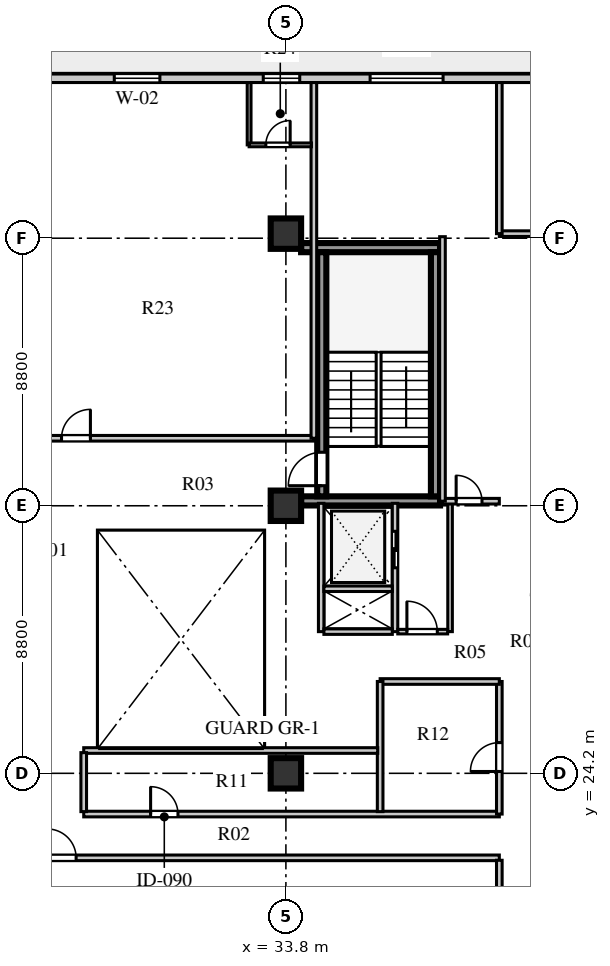
"""IFC4 building model, lengths in metres.
Left out: names, types, materials, properties, quantities, classifications, styles, units other than length and angle.
Written with IfcOpenShell. Run it as: python <this file> out.ifc"""

import sys

from ifc_helpers import new_model, si_unit, direction, frame, frame_2d, origin, origin_2d, place, context, subcontext, project, spatial, rectangle, extrude, element, fill, save


model = new_model("IFC4")
c1 = context("Model", 3, precision=1e-05, world=origin(), true_north=direction((0.0, 1.0)))
c2 = subcontext(c1, "Body", "Model", "MODEL_VIEW")
j1 = project(units=[si_unit("LENGTHUNIT", "METRE"), si_unit("PLANEANGLEUNIT", "RADIAN")], contexts=[c1])
p1 = place(None, origin())
s1 = spatial("IfcSite", under=j1, at=p1, CompositionType="ELEMENT")
p2 = place(p1, origin())
s2 = spatial("IfcBuilding", under=s1, at=p2, CompositionType="ELEMENT")
p3 = place(p2, frame((0.0, 0.0, 150.2)))
s3 = spatial("IfcBuildingStorey", under=s2, at=p3, CompositionType="ELEMENT", Elevation=150.2)
for number, where, z_axis, x_axis in (
    (1, (34.3, 33.16, 0.0), (0.0, 0.0, 1.0), (1.0, 0.0, 0.0)),
    (2, (34.3, 41.49, 0.0), (0.0, 0.0, 1.0), (1.0, 0.0, 0.0)),
):
    element("IfcWall", number, at=place(p3, frame(where, z_axis=z_axis, x_axis=x_axis)), inside=s3, PredefinedType="SHEAR", context=c2, shape_type="SweptSolid", body=[
        extrude(rectangle(XDim=4.57, YDim=0.3, at=frame_2d((2.285, 0.0))), origin(), (0.0, 0.0, 1.0), 3.55),
    ])
p4 = place(p3, frame((34.98, 33.31, 0.0), z_axis=(0.0, 0.0, 1.0), x_axis=(0.0, 1.0, 0.0)))
e3 = element("IfcWall", 3, at=p4, inside=s3, PredefinedType="SHEAR", context=c2, shape_type="SweptSolid", body=[
    extrude(rectangle(XDim=8.03, YDim=0.3, at=frame_2d((4.015, 0.0))), origin(), (0.0, 0.0, 1.0), 3.55),
])
p5 = place(p4, frame((0.35, 0.0, 0.0)))
e4 = element("IfcOpeningElement", 4, at=p5, cuts=e3, PredefinedType="OPENING", context=c2, shape_type="SweptSolid", body=[
    extrude(rectangle(XDim=1.1, YDim=2.1, at=frame_2d((0.55, 1.05))), frame((0.0, 0.16, 0.0), z_axis=(0.0, -1.0, 0.0), x_axis=(1.0, 0.0, 0.0)), (0.0, 0.0, 1.0), 0.32),
])
p6 = place(p3, frame((38.72, 33.31, 0.0), z_axis=(0.0, 0.0, 1.0), x_axis=(0.0, 1.0, 0.0)))
e5 = element("IfcWall", 5, at=p6, inside=s3, PredefinedType="SHEAR", context=c2, shape_type="SweptSolid", body=[
    extrude(rectangle(XDim=8.03, YDim=0.3, at=frame_2d((4.015, 0.0))), origin(), (0.0, 0.0, 1.0), 3.55),
])
for number, where, z_axis, x_axis in (
    (6, (33.8, 24.2, 0.0), (0.0, 0.0, 1.0), (1.0, 0.0, 0.0)),
    (7, (33.8, 33.0, 0.0), (0.0, 0.0, 1.0), (1.0, 0.0, 0.0)),
    (8, (33.8, 41.95, 0.0), (0.0, 0.0, 1.0), (1.0, 0.0, 0.0)),
):
    element("IfcColumn", number, at=place(p3, frame(where, z_axis=z_axis, x_axis=x_axis)), inside=s3, PredefinedType="COLUMN", context=c2, shape_type="SweptSolid", body=[
        extrude(rectangle(XDim=1.0, YDim=1.0, at=origin_2d()), origin(), (0.0, 0.0, 1.0), 3.55),
    ])
p7 = place(p3, frame((45.35, 47.06, 0.0), z_axis=(0.0, 0.0, 1.0), x_axis=(-1.0, 0.0, 0.0)))
e9 = element("IfcWall", 9, at=p7, inside=s3, PredefinedType="STANDARD", context=c2, shape_type="SweptSolid", body=[
    extrude(rectangle(XDim=32.1, YDim=0.28, at=frame_2d((16.05, 0.0))), origin(), (0.0, 0.0, 1.0), 3.55),
])
p8 = place(p7, frame((30.15, 0.0, 0.0)))
e10 = element("IfcOpeningElement", 10, at=p8, cuts=e9, PredefinedType="OPENING", context=c2, shape_type="SweptSolid", body=[
    extrude(rectangle(XDim=1.0, YDim=2.05, at=frame_2d((0.5, 1.025))), frame((0.0, 0.15, 0.0), z_axis=(0.0, -1.0, 0.0), x_axis=(1.0, 0.0, 0.0)), (0.0, 0.0, 1.0), 0.3),
])
p9 = place(p7, frame((24.27, 0.0, 0.8)))
e11 = element("IfcOpeningElement", 11, at=p9, cuts=e9, PredefinedType="OPENING", context=c2, shape_type="SweptSolid", body=[
    extrude(rectangle(XDim=1.8, YDim=2.0, at=frame_2d((0.9, 1.0))), frame((0.0, 0.15, 0.0), z_axis=(0.0, -1.0, 0.0), x_axis=(1.0, 0.0, 0.0)), (0.0, 0.0, 1.0), 0.3),
])
p10 = place(p7, frame((15.695, 0.0, 0.8)))
e12 = element("IfcOpeningElement", 12, at=p10, cuts=e9, PredefinedType="OPENING", context=c2, shape_type="SweptSolid", body=[
    extrude(rectangle(XDim=1.5, YDim=2.0, at=frame_2d((0.75, 1.0))), frame((0.0, 0.15, 0.0), z_axis=(0.0, -1.0, 0.0), x_axis=(1.0, 0.0, 0.0)), (0.0, 0.0, 1.0), 0.3),
])
p11 = place(p7, frame((11.095, 0.0, 0.8)))
e13 = element("IfcOpeningElement", 13, at=p11, cuts=e9, PredefinedType="OPENING", context=c2, shape_type="SweptSolid", body=[
    extrude(rectangle(XDim=1.2, YDim=1.75, at=frame_2d((0.6, 0.875))), frame((0.0, 0.15, 0.0), z_axis=(0.0, -1.0, 0.0), x_axis=(1.0, 0.0, 0.0)), (0.0, 0.0, 1.0), 0.3),
])
p12 = place(p7, frame((6.38, 0.0, 0.8)))
e14 = element("IfcOpeningElement", 14, at=p12, cuts=e9, PredefinedType="OPENING", context=c2, shape_type="SweptSolid", body=[
    extrude(rectangle(XDim=2.4, YDim=2.05, at=frame_2d((1.2, 1.025))), frame((0.0, 0.15, 0.0), z_axis=(0.0, -1.0, 0.0), x_axis=(1.0, 0.0, 0.0)), (0.0, 0.0, 1.0), 0.3),
])
p13 = place(p7, frame((1.27, 0.0, 0.8)))
e15 = element("IfcOpeningElement", 15, at=p13, cuts=e9, PredefinedType="OPENING", context=c2, shape_type="SweptSolid", body=[
    extrude(rectangle(XDim=2.1, YDim=1.95, at=frame_2d((1.05, 0.975))), frame((0.0, 0.15, 0.0), z_axis=(0.0, -1.0, 0.0), x_axis=(1.0, 0.0, 0.0)), (0.0, 0.0, 1.0), 0.3),
])
p14 = place(p3, frame((34.96, 28.86, 0.0), z_axis=(0.0, 0.0, 1.0), x_axis=(0.0, 1.0, 0.0)))
e16 = element("IfcWall", 16, at=p14, inside=s3, PredefinedType="SOLIDWALL", context=c2, shape_type="SweptSolid", body=[
    extrude(rectangle(XDim=4.22, YDim=0.18, at=frame_2d((2.11, 0.0))), origin(), (0.0, 0.0, 1.0), 3.55),
])
p15 = place(p3, frame((37.39, 28.86, 0.0), z_axis=(0.0, 0.0, 1.0), x_axis=(0.0, 1.0, 0.0)))
e17 = element("IfcWall", 17, at=p15, inside=s3, PredefinedType="SOLIDWALL", context=c2, shape_type="SweptSolid", body=[
    extrude(rectangle(XDim=4.22, YDim=0.18, at=frame_2d((2.11, 0.0))), origin(), (0.0, 0.0, 1.0), 3.55),
])
p16 = place(p15, frame((2.1, 0.0, 0.0)))
e18 = element("IfcOpeningElement", 18, at=p16, cuts=e17, PredefinedType="OPENING", context=c2, shape_type="SweptSolid", body=[
    extrude(rectangle(XDim=1.2, YDim=2.12, at=frame_2d((0.6, 1.06))), frame((0.0, 0.1, 0.0), z_axis=(0.0, -1.0, 0.0), x_axis=(1.0, 0.0, 0.0)), (0.0, 0.0, 1.0), 0.2),
])
for number, where, z_axis, x_axis in (
    (19, (35.05, 28.86, 0.0), (0.0, 0.0, 1.0), (1.0, 0.0, 0.0)),
    (20, (35.05, 30.27, 0.0), (0.0, 0.0, 1.0), (1.0, 0.0, 0.0)),
):
    element("IfcWall", number, at=place(p3, frame(where, z_axis=z_axis, x_axis=x_axis)), inside=s3, PredefinedType="SOLIDWALL", context=c2, shape_type="SweptSolid", body=[
        extrude(rectangle(XDim=2.25, YDim=0.18, at=frame_2d((1.125, 0.0))), origin(), (0.0, 0.0, 1.0), 3.55),
    ])
p17 = place(p3, frame((39.2, 28.86, 0.0), z_axis=(0.0, 0.0, 1.0), x_axis=(0.0, 1.0, 0.0)))
e21 = element("IfcWall", 21, at=p17, inside=s3, PredefinedType="PARTITIONING", context=c2, shape_type="SweptSolid", body=[
    extrude(rectangle(XDim=4.22, YDim=0.15, at=frame_2d((2.11, 0.0))), origin(), (0.0, 0.0, 1.0), 3.55),
])
p18 = place(p3, frame((37.48, 28.86, 0.0), z_axis=(0.0, 0.0, 1.0), x_axis=(1.0, 0.0, 0.0)))
e22 = element("IfcWall", 22, at=p18, inside=s3, PredefinedType="PARTITIONING", context=c2, shape_type="SweptSolid", body=[
    extrude(rectangle(XDim=1.64, YDim=0.15, at=frame_2d((0.82, 0.0))), origin(), (0.0, 0.0, 1.0), 3.55),
])
p19 = place(p18, frame((0.3, 0.0, 0.0)))
e23 = element("IfcOpeningElement", 23, at=p19, cuts=e22, PredefinedType="OPENING", context=c2, shape_type="SweptSolid", body=[
    extrude(rectangle(XDim=1.0, YDim=2.1, at=frame_2d((0.5, 1.05))), frame((0.0, 0.085, 0.0), z_axis=(0.0, -1.0, 0.0), x_axis=(1.0, 0.0, 0.0)), (0.0, 0.0, 1.0), 0.17),
])
p20 = place(p3, frame((25.22, 21.42, 0.0), z_axis=(0.0, 0.0, 1.0), x_axis=(1.0, 0.0, 0.0)))
e24 = element("IfcWall", 24, at=p20, inside=s3, PredefinedType="SOLIDWALL", context=c2, shape_type="SweptSolid", body=[
    extrude(rectangle(XDim=15.6, YDim=0.185, at=frame_2d((7.8, 0.0))), origin(), (0.0, 0.0, 1.0), 3.15),
])
p21 = place(p20, frame((0.73, 0.0, 0.0)))
e25 = element("IfcOpeningElement", 25, at=p21, cuts=e24, PredefinedType="OPENING", context=c2, shape_type="SweptSolid", body=[
    extrude(rectangle(XDim=0.95, YDim=2.1, at=frame_2d((0.475, 1.05))), frame((0.0, 0.103, 0.0), z_axis=(0.0, -1.0, 0.0), x_axis=(1.0, 0.0, 0.0)), (0.0, 0.0, 1.0), 0.205),
])
p22 = place(p3, frame((27.15, 22.86, 0.0), z_axis=(0.0, 0.0, 1.0), x_axis=(1.0, 0.0, 0.0)))
e26 = element("IfcWall", 26, at=p22, inside=s3, PredefinedType="SOLIDWALL", context=c2, shape_type="SweptSolid", body=[
    extrude(rectangle(XDim=13.67, YDim=0.185, at=frame_2d((6.835, 0.0))), origin(), (0.0, 0.0, 1.0), 3.55),
])
p23 = place(p22, frame((2.2, 0.0, 0.0)))
e27 = element("IfcOpeningElement", 27, at=p23, cuts=e26, PredefinedType="OPENING", context=c2, shape_type="SweptSolid", body=[
    extrude(rectangle(XDim=0.9, YDim=2.08, at=frame_2d((0.45, 1.04))), frame((0.0, 0.103, 0.0), z_axis=(0.0, -1.0, 0.0), x_axis=(1.0, 0.0, 0.0)), (0.0, 0.0, 1.0), 0.205),
])
p24 = place(p3, frame((25.22, 35.22, 0.0), z_axis=(0.0, 0.0, 1.0), x_axis=(1.0, 0.0, 0.0)))
e28 = element("IfcWall", 28, at=p24, inside=s3, PredefinedType="SOLIDWALL", context=c2, shape_type="SweptSolid", body=[
    extrude(rectangle(XDim=9.5, YDim=0.185, at=frame_2d((4.75, 0.0))), origin(), (0.0, 0.0, 1.0), 3.55),
])
p25 = place(p24, frame((1.2, 0.0, 0.0)))
e29 = element("IfcOpeningElement", 29, at=p25, cuts=e28, PredefinedType="OPENING", context=c2, shape_type="SweptSolid", body=[
    extrude(rectangle(XDim=0.95, YDim=2.1, at=frame_2d((0.475, 1.05))), frame((0.0, 0.103, 0.0), z_axis=(0.0, -1.0, 0.0), x_axis=(1.0, 0.0, 0.0)), (0.0, 0.0, 1.0), 0.205),
])
p26 = place(p3, frame((40.82, 41.95, 0.0), z_axis=(0.0, 0.0, 1.0), x_axis=(1.0, 0.0, 0.0)))
e30 = element("IfcWall", 30, at=p26, inside=s3, PredefinedType="SOLIDWALL", context=c2, shape_type="SweptSolid", body=[
    extrude(rectangle(XDim=7.3, YDim=0.185, at=frame_2d((3.65, 0.0))), origin(), (0.0, 0.0, 1.0), 2.9),
])
p27 = place(p3, frame((40.82, 22.86, 0.0), z_axis=(0.0, 0.0, 1.0), x_axis=(0.0, 1.0, 0.0)))
e31 = element("IfcWall", 31, at=p27, inside=s3, PredefinedType="SOLIDWALL", context=c2, shape_type="SweptSolid", body=[
    extrude(rectangle(XDim=4.36, YDim=0.185, at=frame_2d((2.18, 0.0))), origin(), (0.0, 0.0, 1.0), 3.55),
])
p28 = place(p27, frame((1.4, 0.0, 0.0)))
e32 = element("IfcOpeningElement", 32, at=p28, cuts=e31, PredefinedType="OPENING", context=c2, shape_type="SweptSolid", body=[
    extrude(rectangle(XDim=0.95, YDim=2.1, at=frame_2d((0.475, 1.05))), frame((0.0, 0.103, 0.0), z_axis=(0.0, -1.0, 0.0), x_axis=(1.0, 0.0, 0.0)), (0.0, 0.0, 1.0), 0.205),
])
p29 = place(p3, frame((36.9, 27.22, 0.0), z_axis=(0.0, 0.0, 1.0), x_axis=(1.0, 0.0, 0.0)))
e33 = element("IfcWall", 33, at=p29, inside=s3, PredefinedType="SOLIDWALL", context=c2, shape_type="SweptSolid", body=[
    extrude(rectangle(XDim=3.92, YDim=0.185, at=frame_2d((1.96, 0.0))), origin(), (0.0, 0.0, 1.0), 3.15),
])
p30 = place(p3, frame((36.9, 22.94, 0.0), z_axis=(0.0, 0.0, 1.0), x_axis=(0.0, 1.0, 0.0)))
e34 = element("IfcWall", 34, at=p30, inside=s3, PredefinedType="SOLIDWALL", context=c2, shape_type="SweptSolid", body=[
    extrude(rectangle(XDim=4.28, YDim=0.185, at=frame_2d((2.14, 0.0))), origin(), (0.0, 0.0, 1.0), 3.55),
])
p31 = place(p3, frame((27.15, 24.95, 0.0), z_axis=(0.0, 0.0, 1.0), x_axis=(1.0, 0.0, 0.0)))
e35 = element("IfcWall", 35, at=p31, inside=s3, PredefinedType="SOLIDWALL", context=c2, shape_type="SweptSolid", body=[
    extrude(rectangle(XDim=9.67, YDim=0.185, at=frame_2d((4.835, 0.0))), origin(), (0.0, 0.0, 1.0), 3.0),
])
p32 = place(p3, frame((27.15, 22.94, 0.0), z_axis=(0.0, 0.0, 1.0), x_axis=(0.0, 1.0, 0.0)))
e36 = element("IfcWall", 36, at=p32, inside=s3, PredefinedType="SOLIDWALL", context=c2, shape_type="SweptSolid", body=[
    extrude(rectangle(XDim=1.94, YDim=0.185, at=frame_2d((0.97, 0.0))), origin(), (0.0, 0.0, 1.0), 3.55),
])
p33 = place(p3, frame((40.82, 10.28, 0.0), z_axis=(0.0, 0.0, 1.0), x_axis=(0.0, 1.0, 0.0)))
e37 = element("IfcWall", 37, at=p33, inside=s3, PredefinedType="SOLIDWALL", context=c2, shape_type="SweptSolid", body=[
    extrude(rectangle(XDim=11.06, YDim=0.185, at=frame_2d((5.53, 0.0))), origin(), (0.0, 0.0, 1.0), 3.55),
])
p34 = place(p3, frame((34.72, 35.22, 0.0), z_axis=(0.0, 0.0, 1.0), x_axis=(0.0, 1.0, 0.0)))
e38 = element("IfcWall", 38, at=p34, inside=s3, PredefinedType="SOLIDWALL", context=c2, shape_type="SweptSolid", body=[
    extrude(rectangle(XDim=11.7, YDim=0.185, at=frame_2d((5.85, 0.0))), origin(), (0.0, 0.0, 1.0), 3.55),
])
p35 = place(p3, frame((32.59, 44.87, 0.0), z_axis=(0.0, 0.0, 1.0), x_axis=(0.0, 1.0, 0.0)))
e39 = element("IfcWall", 39, at=p35, inside=s3, PredefinedType="PLUMBINGWALL", context=c2, shape_type="SweptSolid", body=[
    extrude(rectangle(XDim=2.05, YDim=0.125, at=frame_2d((1.025, 0.0))), origin(), (0.0, 0.0, 1.0), 3.55),
])
p36 = place(p3, frame((32.59, 44.87, 0.0), z_axis=(0.0, 0.0, 1.0), x_axis=(1.0, 0.0, 0.0)))
e40 = element("IfcWall", 40, at=p36, inside=s3, PredefinedType="PLUMBINGWALL", context=c2, shape_type="SweptSolid", body=[
    extrude(rectangle(XDim=2.05, YDim=0.125, at=frame_2d((1.025, 0.0))), origin(), (0.0, 0.0, 1.0), 3.55),
])
p37 = place(p36, frame((0.55, 0.0, 0.0)))
e41 = element("IfcOpeningElement", 41, at=p37, cuts=e40, PredefinedType="OPENING", context=c2, shape_type="SweptSolid", body=[
    extrude(rectangle(XDim=0.8, YDim=2.05, at=frame_2d((0.4, 1.025))), frame((0.0, 0.073, 0.0), z_axis=(0.0, -1.0, 0.0), x_axis=(1.0, 0.0, 0.0)), (0.0, 0.0, 1.0), 0.145),
])
p38 = place(p3, frame((38.95, 33.15, 0.0), z_axis=(0.0, 0.0, 1.0), x_axis=(1.0, 0.0, 0.0)))
e42 = element("IfcWall", 42, at=p38, inside=s3, PredefinedType="SOLIDWALL", context=c2, shape_type="SweptSolid", body=[
    extrude(rectangle(XDim=1.87, YDim=0.185, at=frame_2d((0.935, 0.0))), origin(), (0.0, 0.0, 1.0), 3.55),
])
p39 = place(p38, frame((0.45, 0.0, 0.0)))
e43 = element("IfcOpeningElement", 43, at=p39, cuts=e42, PredefinedType="OPENING", context=c2, shape_type="SweptSolid", body=[
    extrude(rectangle(XDim=0.85, YDim=2.05, at=frame_2d((0.425, 1.025))), frame((0.0, 0.103, 0.0), z_axis=(0.0, -1.0, 0.0), x_axis=(1.0, 0.0, 0.0)), (0.0, 0.0, 1.0), 0.205),
])
p40 = place(p3, frame((38.95, 33.15, 0.0), z_axis=(0.0, 0.0, 1.0), x_axis=(0.0, 1.0, 0.0)))
e44 = element("IfcWall", 44, at=p40, inside=s3, PredefinedType="SOLIDWALL", context=c2, shape_type="SweptSolid", body=[
    extrude(rectangle(XDim=8.7, YDim=0.185, at=frame_2d((4.35, 0.0))), origin(), (0.0, 0.0, 1.0), 3.55),
])
p41 = place(p3, frame((40.82, 41.95, 0.0), z_axis=(0.0, 0.0, 1.0), x_axis=(0.0, 1.0, 0.0)))
e45 = element("IfcWall", 45, at=p41, inside=s3, PredefinedType="SOLIDWALL", context=c2, shape_type="SweptSolid", body=[
    extrude(rectangle(XDim=4.97, YDim=0.185, at=frame_2d((2.485, 0.0))), origin(), (0.0, 0.0, 1.0), 3.55),
])
p42 = place(p10, origin())
e46 = element("IfcWindow", 46, at=p42, inside=s3, PartitioningType="SINGLE_PANEL", PredefinedType="WINDOW", context=c2, shape_type="SweptSolid", body=[
    extrude(rectangle(XDim=1.5, YDim=2.0, at=frame_2d((0.75, 1.0))), frame((0.0, 0.03, 0.0), z_axis=(0.0, -1.0, 0.0), x_axis=(1.0, 0.0, 0.0)), (0.0, 0.0, 1.0), 0.06),
])
fill(e12, e46)
p43 = place(p11, origin())
e47 = element("IfcWindow", 47, at=p43, inside=s3, PartitioningType="SINGLE_PANEL", PredefinedType="WINDOW", context=c2, shape_type="SweptSolid", body=[
    extrude(rectangle(XDim=1.2, YDim=1.75, at=frame_2d((0.6, 0.875))), frame((0.0, 0.03, 0.0), z_axis=(0.0, -1.0, 0.0), x_axis=(1.0, 0.0, 0.0)), (0.0, 0.0, 1.0), 0.06),
])
fill(e13, e47)
p44 = place(p12, origin())
e48 = element("IfcWindow", 48, at=p44, inside=s3, PartitioningType="SINGLE_PANEL", PredefinedType="WINDOW", context=c2, shape_type="SweptSolid", body=[
    extrude(rectangle(XDim=2.4, YDim=2.05, at=frame_2d((1.2, 1.025))), frame((0.0, 0.03, 0.0), z_axis=(0.0, -1.0, 0.0), x_axis=(1.0, 0.0, 0.0)), (0.0, 0.0, 1.0), 0.06),
])
fill(e14, e48)
p45 = place(p5, origin())
e49 = element("IfcDoor", 49, at=p45, inside=s3, OperationType="SINGLE_SWING_LEFT", PredefinedType="DOOR", context=c2, shape_type="SweptSolid", body=[
    extrude(rectangle(XDim=1.1, YDim=2.1, at=frame_2d((0.55, 1.05))), frame((0.0, 0.025, 0.0), z_axis=(0.0, -1.0, 0.0), x_axis=(1.0, 0.0, 0.0)), (0.0, 0.0, 1.0), 0.05),
])
fill(e4, e49)
p46 = place(p16, frame((1.2, 0.0, 0.0), z_axis=(0.0, 0.0, 1.0), x_axis=(-1.0, 0.0, 0.0)))
e50 = element("IfcDoor", 50, at=p46, inside=s3, OperationType="DOUBLE_DOOR_SLIDING", PredefinedType="DOOR", context=c2, shape_type="SweptSolid", body=[
    extrude(rectangle(XDim=1.2, YDim=2.12, at=frame_2d((0.6, 1.06))), frame((0.0, 0.025, 0.0), z_axis=(0.0, -1.0, 0.0), x_axis=(1.0, 0.0, 0.0)), (0.0, 0.0, 1.0), 0.05),
])
fill(e18, e50)
p47 = place(p19, origin())
e51 = element("IfcDoor", 51, at=p47, inside=s3, OperationType="SINGLE_SWING_LEFT", PredefinedType="DOOR", context=c2, shape_type="SweptSolid", body=[
    extrude(rectangle(XDim=1.0, YDim=2.1, at=frame_2d((0.5, 1.05))), frame((0.0, 0.025, 0.0), z_axis=(0.0, -1.0, 0.0), x_axis=(1.0, 0.0, 0.0)), (0.0, 0.0, 1.0), 0.05),
])
fill(e23, e51)
p48 = place(p23, origin())
e52 = element("IfcDoor", 52, at=p48, inside=s3, OperationType="SINGLE_SWING_LEFT", PredefinedType="DOOR", context=c2, shape_type="SweptSolid", body=[
    extrude(rectangle(XDim=0.9, YDim=2.08, at=frame_2d((0.45, 1.04))), frame((0.0, 0.025, 0.0), z_axis=(0.0, -1.0, 0.0), x_axis=(1.0, 0.0, 0.0)), (0.0, 0.0, 1.0), 0.05),
])
fill(e27, e52)
p49 = place(p28, frame((0.95, 0.0, 0.0), z_axis=(0.0, 0.0, 1.0), x_axis=(-1.0, 0.0, 0.0)))
e53 = element("IfcDoor", 53, at=p49, inside=s3, OperationType="SINGLE_SWING_RIGHT", PredefinedType="DOOR", context=c2, shape_type="SweptSolid", body=[
    extrude(rectangle(XDim=0.95, YDim=2.1, at=frame_2d((0.475, 1.05))), frame((0.0, 0.025, 0.0), z_axis=(0.0, -1.0, 0.0), x_axis=(1.0, 0.0, 0.0)), (0.0, 0.0, 1.0), 0.05),
])
fill(e32, e53)
p50 = place(p21, frame((0.95, 0.0, 0.0), z_axis=(0.0, 0.0, 1.0), x_axis=(-1.0, 0.0, 0.0)))
e54 = element("IfcDoor", 54, at=p50, inside=s3, OperationType="SINGLE_SWING_RIGHT", PredefinedType="DOOR", context=c2, shape_type="SweptSolid", body=[
    extrude(rectangle(XDim=0.95, YDim=2.1, at=frame_2d((0.475, 1.05))), frame((0.0, 0.025, 0.0), z_axis=(0.0, -1.0, 0.0), x_axis=(1.0, 0.0, 0.0)), (0.0, 0.0, 1.0), 0.05),
])
fill(e25, e54)
p51 = place(p25, origin())
e55 = element("IfcDoor", 55, at=p51, inside=s3, OperationType="SINGLE_SWING_RIGHT", PredefinedType="DOOR", context=c2, shape_type="SweptSolid", body=[
    extrude(rectangle(XDim=0.95, YDim=2.1, at=frame_2d((0.475, 1.05))), frame((0.0, 0.025, 0.0), z_axis=(0.0, -1.0, 0.0), x_axis=(1.0, 0.0, 0.0)), (0.0, 0.0, 1.0), 0.05),
])
fill(e29, e55)
p52 = place(p37, frame((0.8, 0.0, 0.0), z_axis=(0.0, 0.0, 1.0), x_axis=(-1.0, 0.0, 0.0)))
e56 = element("IfcDoor", 56, at=p52, inside=s3, OperationType="SINGLE_SWING_LEFT", PredefinedType="DOOR", context=c2, shape_type="SweptSolid", body=[
    extrude(rectangle(XDim=0.8, YDim=2.05, at=frame_2d((0.4, 1.025))), frame((0.0, 0.025, 0.0), z_axis=(0.0, -1.0, 0.0), x_axis=(1.0, 0.0, 0.0)), (0.0, 0.0, 1.0), 0.05),
])
fill(e41, e56)
p53 = place(p39, origin())
e57 = element("IfcDoor", 57, at=p53, inside=s3, OperationType="SINGLE_SWING_LEFT", PredefinedType="DOOR", context=c2, shape_type="SweptSolid", body=[
    extrude(rectangle(XDim=0.85, YDim=2.05, at=frame_2d((0.425, 1.025))), frame((0.0, 0.025, 0.0), z_axis=(0.0, -1.0, 0.0), x_axis=(1.0, 0.0, 0.0)), (0.0, 0.0, 1.0), 0.05),
])
fill(e43, e57)
save(model, sys.argv[1])
